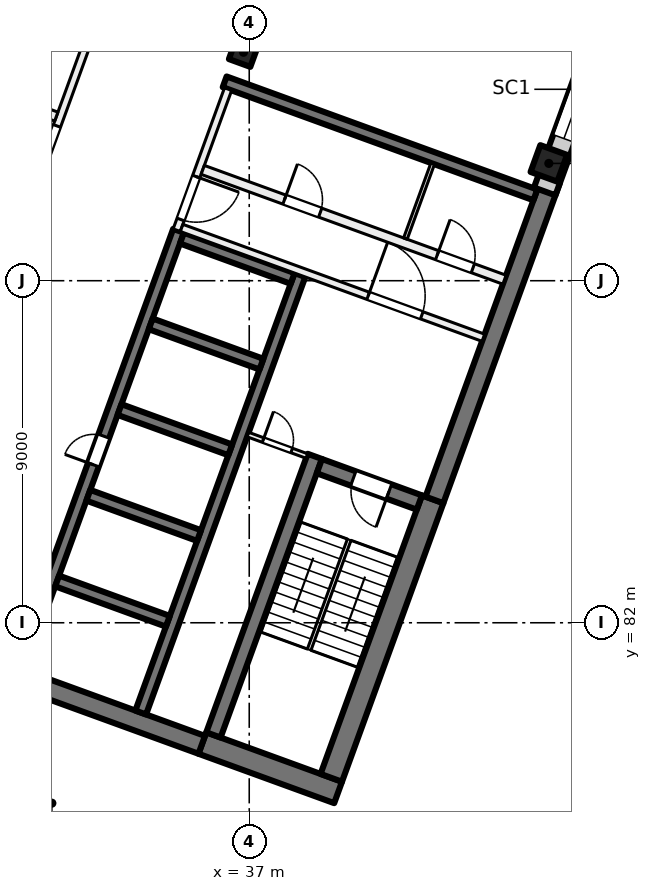
"""IFC4 building model, lengths in metres.
Left out: names, types, materials, properties, quantities, classifications, styles, units other than length and angle.
Written with IfcOpenShell. Run it as: python <this file> out.ifc"""

import sys

from ifc_helpers import new_model, si_unit, direction, frame, frame_2d, origin, origin_2d, place, context, subcontext, project, spatial, rectangle, extrude, element, fill, save


model = new_model("IFC4")
c1 = context("Model", 3, precision=1e-05, world=origin(), true_north=direction((0.0, 1.0)))
c2 = subcontext(c1, "Body", "Model", "MODEL_VIEW")
j1 = project(units=[si_unit("LENGTHUNIT", "METRE"), si_unit("PLANEANGLEUNIT", "RADIAN")], contexts=[c1])
p1 = place(None, origin())
s1 = spatial("IfcSite", under=j1, at=p1, CompositionType="ELEMENT")
p2 = place(p1, origin())
s2 = spatial("IfcBuilding", under=s1, at=p2, CompositionType="ELEMENT")
p3 = place(p2, frame((0.0, 0.0, 216.0)))
s3 = spatial("IfcBuildingStorey", under=s2, at=p3, CompositionType="ELEMENT", Elevation=216.0)
p4 = place(p3, frame((36.849, 97.011, 0.0), z_axis=(0.0, 0.0, 1.0), x_axis=(-0.342020143326, -0.939692620786, 0.0)))
e1 = element("IfcColumn", 1, at=p4, inside=s3, PredefinedType="COLUMN", context=c2, shape_type="SweptSolid", body=[
    extrude(rectangle(XDim=0.6, YDim=0.6, at=origin_2d()), origin(), (0.0, 0.0, 1.0), 4.0),
])
p5 = place(p3, frame((44.884, 94.087, 0.0), z_axis=(0.0, 0.0, 1.0), x_axis=(-0.342020143326, -0.939692620786, 0.0)))
e2 = element("IfcColumn", 2, at=p5, inside=s3, PredefinedType="COLUMN", context=c2, shape_type="SweptSolid", body=[
    extrude(rectangle(XDim=0.75, YDim=0.75, at=origin_2d()), origin(), (0.0, 0.0, 1.0), 4.0),
])
p6 = place(p3, frame((39.338, 77.535, 0.0), z_axis=(0.0, 0.0, 1.0), x_axis=(-0.939701471648, 0.341995824804, 0.0)))
e3 = element("IfcWall", 3, at=p6, inside=s3, PredefinedType="SHEAR", context=c2, shape_type="SweptSolid", body=[
    extrude(rectangle(XDim=3.8, YDim=0.6, at=frame_2d((1.9, 0.0))), origin(), (0.0, 0.0, 1.0), 4.0),
])
p7 = place(p3, frame((35.75, 78.788, 0.0), z_axis=(0.0, 0.0, 1.0), x_axis=(-0.939692894512, 0.342019391267, 0.0)))
e4 = element("IfcWall", 4, at=p7, inside=s3, PredefinedType="SHEAR", context=c2, shape_type="SweptSolid", body=[
    extrude(rectangle(XDim=14.4, YDim=0.5, at=frame_2d((7.2, 0.0))), origin(), (0.0, 0.0, 1.0), 4.0),
])
p8 = place(p3, frame((39.159, 77.92, 0.0), z_axis=(0.0, 0.0, 1.0), x_axis=(0.342016982193, 0.939693771338, 0.0)))
e5 = element("IfcWall", 5, at=p8, inside=s3, PredefinedType="SHEAR", context=c2, shape_type="SweptSolid", body=[
    extrude(rectangle(XDim=7.8, YDim=0.6, at=frame_2d((3.9, 0.0))), origin(), (0.0, 0.0, 1.0), 4.0),
])
p9 = place(p3, frame((41.874, 85.232, 0.0), z_axis=(0.0, 0.0, 1.0), x_axis=(0.342020437038, 0.939692513883, 0.0)))
e6 = element("IfcWall", 6, at=p9, inside=s3, PredefinedType="SHEAR", context=c2, shape_type="SweptSolid", body=[
    extrude(rectangle(XDim=8.975, YDim=0.5, at=frame_2d((4.487, 0.0))), origin(), (0.0, 0.0, 1.0), 4.0),
])
p10 = place(p3, frame((36.058, 79.048, 0.0), z_axis=(0.0, 0.0, 1.0), x_axis=(0.342016982193, 0.939693771338, 0.0)))
e7 = element("IfcWall", 7, at=p10, inside=s3, PredefinedType="SHEAR", context=c2, shape_type="SweptSolid", body=[
    extrude(rectangle(XDim=7.8, YDim=0.4, at=frame_2d((3.9, 0.0))), origin(), (0.0, 0.0, 1.0), 4.0),
])
p11 = place(p3, frame((41.476, 85.164, 0.0), z_axis=(0.0, 0.0, 1.0), x_axis=(-0.939678810556, 0.342058084236, 0.0)))
e8 = element("IfcWall", 8, at=p11, inside=s3, PredefinedType="SHEAR", context=c2, shape_type="SweptSolid", body=[
    extrude(rectangle(XDim=2.8, YDim=0.4, at=frame_2d((1.4, 0.0))), origin(), (0.0, 0.0, 1.0), 4.0),
])
p12 = place(p11, frame((0.85, 0.0, 0.0)))
e9 = element("IfcOpeningElement", 9, at=p12, cuts=e8, PredefinedType="OPENING", context=c2, shape_type="SweptSolid", body=[
    extrude(rectangle(XDim=1.0, YDim=2.1, at=frame_2d((0.5, 1.05))), frame((0.0, 0.21, 0.0), z_axis=(0.0, -1.0, 0.0), x_axis=(1.0, 0.0, 0.0)), (0.0, 0.0, 1.0), 0.42),
])
p13 = place(p3, frame((30.949, 80.801, 0.0), z_axis=(0.0, 0.0, 1.0), x_axis=(0.342016684409, 0.939693879721, 0.0)))
e10 = element("IfcWall", 10, at=p13, inside=s3, PredefinedType="SHEAR", context=c2, shape_type="SweptSolid", body=[
    extrude(rectangle(XDim=12.25, YDim=0.3, at=frame_2d((6.125, 0.0))), origin(), (0.0, 0.0, 1.0), 4.0),
])
p14 = place(p13, frame((0.9, 0.0, 0.0)))
e11 = element("IfcOpeningElement", 11, at=p14, cuts=e10, PredefinedType="OPENING", context=c2, shape_type="SweptSolid", body=[
    extrude(rectangle(XDim=0.8, YDim=2.1, at=frame_2d((0.4, 1.05))), frame((0.0, 0.16, 0.0), z_axis=(0.0, -1.0, 0.0), x_axis=(1.0, 0.0, 0.0)), (0.0, 0.0, 1.0), 0.32),
])
p15 = place(p13, frame((5.7, 0.0, 0.0)))
e12 = element("IfcOpeningElement", 12, at=p15, cuts=e10, PredefinedType="OPENING", context=c2, shape_type="SweptSolid", body=[
    extrude(rectangle(XDim=0.8, YDim=2.1, at=frame_2d((0.4, 1.05))), frame((0.0, 0.16, 0.0), z_axis=(0.0, -1.0, 0.0), x_axis=(1.0, 0.0, 0.0)), (0.0, 0.0, 1.0), 0.32),
])
p16 = place(p3, frame((34.144, 79.638, 0.0), z_axis=(0.0, 0.0, 1.0), x_axis=(0.342016684409, 0.939693879721, 0.0)))
e13 = element("IfcWall", 13, at=p16, inside=s3, PredefinedType="SHEAR", context=c2, shape_type="SweptSolid", body=[
    extrude(rectangle(XDim=12.25, YDim=0.3, at=frame_2d((6.125, 0.0))), origin(), (0.0, 0.0, 1.0), 4.0),
])
p17 = place(p3, frame((34.858, 82.039, 0.0), z_axis=(0.0, 0.0, 1.0), x_axis=(-0.939689908313, 0.342027595692, 0.0)))
e14 = element("IfcWall", 14, at=p17, inside=s3, PredefinedType="SHEAR", context=c2, shape_type="SweptSolid", body=[
    extrude(rectangle(XDim=3.1, YDim=0.3, at=frame_2d((1.55, 0.0))), origin(), (0.0, 0.0, 1.0), 4.0),
])
p18 = place(p3, frame((35.679, 84.294, 0.0), z_axis=(0.0, 0.0, 1.0), x_axis=(-0.939706007505, 0.341983361377, 0.0)))
e15 = element("IfcWall", 15, at=p18, inside=s3, PredefinedType="SHEAR", context=c2, shape_type="SweptSolid", body=[
    extrude(rectangle(XDim=3.1, YDim=0.3, at=frame_2d((1.55, 0.0))), origin(), (0.0, 0.0, 1.0), 4.0),
])
for number, where, z_axis, x_axis in (
    (16, (36.5, 86.549, 0.0), (0.0, 0.0, 1.0), (-0.94, 0.342, 0.0)),
    (17, (37.321, 88.805, 0.0), (0.0, 0.0, 1.0), (-0.94, 0.342, 0.0)),
    (18, (38.142, 91.06, 0.0), (0.0, 0.0, 1.0), (-0.94, 0.342, 0.0)),
):
    element("IfcWall", number, at=place(p3, frame(where, z_axis=z_axis, x_axis=x_axis)), inside=s3, PredefinedType="SHEAR", context=c2, shape_type="SweptSolid", body=[
        extrude(rectangle(XDim=3.1, YDim=0.3, at=frame_2d((1.55, 0.0))), origin(), (0.0, 0.0, 1.0), 4.0),
    ])
p19 = place(p3, frame((44.529, 93.258, 0.0), z_axis=(0.0, 0.0, 1.0), x_axis=(-0.9396917844, 0.342022441267, 0.0)))
e19 = element("IfcWall", 19, at=p19, inside=s3, PredefinedType="SHEAR", context=c2, shape_type="SweptSolid", body=[
    extrude(rectangle(XDim=8.7, YDim=0.3, at=frame_2d((4.35, 0.0))), origin(), (0.0, 0.0, 1.0), 4.0),
])
p20 = place(p3, frame((51.877, 112.862, 0.0), z_axis=(0.0, 0.0, 1.0), x_axis=(-0.342020589714, -0.939692458314, 0.0)))
e20 = element("IfcWall", 20, at=p20, inside=s3, PredefinedType="SOLIDWALL", context=c2, shape_type="SweptSolid", body=[
    extrude(rectangle(XDim=20.765, YDim=0.6, at=frame_2d((10.382, 0.0))), origin(), (0.0, 0.0, 1.0), 3.625),
])
p21 = place(p20, frame((2.785, 0.0, 0.9)))
e21 = element("IfcOpeningElement", 21, at=p21, cuts=e20, PredefinedType="OPENING", context=c2, shape_type="SweptSolid", body=[
    extrude(rectangle(XDim=3.0, YDim=2.4, at=frame_2d((1.5, 1.2))), frame((0.0, 0.31, 0.0), z_axis=(0.0, -1.0, 0.0), x_axis=(1.0, 0.0, 0.0)), (0.0, 0.0, 1.0), 0.62),
])
p22 = place(p20, frame((7.285, 0.0, 0.9)))
e22 = element("IfcOpeningElement", 22, at=p22, cuts=e20, PredefinedType="OPENING", context=c2, shape_type="SweptSolid", body=[
    extrude(rectangle(XDim=3.0, YDim=2.4, at=frame_2d((1.5, 1.2))), frame((0.0, 0.31, 0.0), z_axis=(0.0, -1.0, 0.0), x_axis=(1.0, 0.0, 0.0)), (0.0, 0.0, 1.0), 0.62),
])
p23 = place(p20, frame((11.785, 0.0, 0.9)))
e23 = element("IfcOpeningElement", 23, at=p23, cuts=e20, PredefinedType="OPENING", context=c2, shape_type="SweptSolid", body=[
    extrude(rectangle(XDim=3.0, YDim=2.4, at=frame_2d((1.5, 1.2))), frame((0.0, 0.31, 0.0), z_axis=(0.0, -1.0, 0.0), x_axis=(1.0, 0.0, 0.0)), (0.0, 0.0, 1.0), 0.62),
])
p24 = place(p20, frame((16.285, 0.0, 0.9)))
e24 = element("IfcOpeningElement", 24, at=p24, cuts=e20, PredefinedType="OPENING", context=c2, shape_type="SweptSolid", body=[
    extrude(rectangle(XDim=3.0, YDim=2.4, at=frame_2d((1.5, 1.2))), frame((0.0, 0.31, 0.0), z_axis=(0.0, -1.0, 0.0), x_axis=(1.0, 0.0, 0.0)), (0.0, 0.0, 1.0), 0.62),
])
p25 = place(p3, frame((31.427, 93.663, 0.0), z_axis=(0.0, 0.0, 1.0), x_axis=(0.342030870568, 0.93968871632, 0.0)))
e25 = element("IfcWall", 25, at=p25, inside=s3, PredefinedType="PARTITIONING", context=c2, shape_type="SweptSolid", body=[
    extrude(rectangle(XDim=3.95, YDim=0.2, at=frame_2d((1.975, 0.0))), origin(), (0.0, 0.0, 1.0), 3.625),
])
p26 = place(p25, frame((0.3, 0.0, 0.0)))
e26 = element("IfcOpeningElement", 26, at=p26, cuts=e25, PredefinedType="OPENING", context=c2, shape_type="SweptSolid", body=[
    extrude(rectangle(XDim=1.2, YDim=2.1, at=frame_2d((0.6, 1.05))), frame((0.0, 0.11, 0.0), z_axis=(0.0, -1.0, 0.0), x_axis=(1.0, 0.0, 0.0)), (0.0, 0.0, 1.0), 0.22),
])
p27 = place(p3, frame((23.983, 98.208, 0.0), z_axis=(0.0, 0.0, 1.0), x_axis=(0.939699751196, -0.342000552051, 0.0)))
e27 = element("IfcWall", 27, at=p27, inside=s3, PredefinedType="PARTITIONING", context=c2, shape_type="SweptSolid", body=[
    extrude(rectangle(XDim=8.45, YDim=0.25, at=frame_2d((4.225, 0.0))), origin(), (0.0, 0.0, 1.0), 3.625),
])
p28 = place(p27, frame((5.96, 0.0, 0.0)))
e28 = element("IfcOpeningElement", 28, at=p28, cuts=e27, PredefinedType="OPENING", context=c2, shape_type="SweptSolid", body=[
    extrude(rectangle(XDim=0.8, YDim=2.1, at=frame_2d((0.4, 1.05))), frame((0.0, 0.135, 0.0), z_axis=(0.0, -1.0, 0.0), x_axis=(1.0, 0.0, 0.0)), (0.0, 0.0, 1.0), 0.27),
])
p29 = place(p27, frame((1.685, 0.0, 0.0)))
e29 = element("IfcOpeningElement", 29, at=p29, cuts=e27, PredefinedType="OPENING", context=c2, shape_type="SweptSolid", body=[
    extrude(rectangle(XDim=0.8, YDim=2.1, at=frame_2d((0.4, 1.05))), frame((0.0, 0.135, 0.0), z_axis=(0.0, -1.0, 0.0), x_axis=(1.0, 0.0, 0.0)), (0.0, 0.0, 1.0), 0.27),
])
p30 = place(p3, frame((36.443, 96.041, 0.0), z_axis=(0.0, 0.0, 1.0), x_axis=(-0.341996156931, -0.939701350773, 0.0)))
e30 = element("IfcWall", 30, at=p30, inside=s3, PredefinedType="PARTITIONING", context=c2, shape_type="SweptSolid", body=[
    extrude(rectangle(XDim=3.95, YDim=0.2, at=frame_2d((1.975, 0.0))), origin(), (0.0, 0.0, 1.0), 3.625),
])
p31 = place(p30, frame((2.45, 0.0, 0.0)))
e31 = element("IfcOpeningElement", 31, at=p31, cuts=e30, PredefinedType="OPENING", context=c2, shape_type="SweptSolid", body=[
    extrude(rectangle(XDim=1.2, YDim=2.1, at=frame_2d((0.6, 1.05))), frame((0.0, 0.11, 0.0), z_axis=(0.0, -1.0, 0.0), x_axis=(1.0, 0.0, 0.0)), (0.0, 0.0, 1.0), 0.22),
])
p32 = place(p3, frame((35.22, 92.389, 0.0), z_axis=(0.0, 0.0, 1.0), x_axis=(0.939690465531, -0.342026064782, 0.0)))
e32 = element("IfcWall", 32, at=p32, inside=s3, PredefinedType="PARTITIONING", context=c2, shape_type="SweptSolid", body=[
    extrude(rectangle(XDim=8.45, YDim=0.2, at=frame_2d((4.225, 0.0))), origin(), (0.0, 0.0, 1.0), 3.625),
])
p33 = place(p32, frame((5.225, 0.0, 0.0)))
e33 = element("IfcOpeningElement", 33, at=p33, cuts=e32, PredefinedType="OPENING", context=c2, shape_type="SweptSolid", body=[
    extrude(rectangle(XDim=1.5, YDim=2.1, at=frame_2d((0.75, 1.05))), frame((0.0, 0.11, 0.0), z_axis=(0.0, -1.0, 0.0), x_axis=(1.0, 0.0, 0.0)), (0.0, 0.0, 1.0), 0.22),
])
p34 = place(p3, frame((35.776, 93.916, 0.0), z_axis=(0.0, 0.0, 1.0), x_axis=(0.939690465531, -0.342026064782, 0.0)))
e34 = element("IfcWall", 34, at=p34, inside=s3, PredefinedType="PARTITIONING", context=c2, shape_type="SweptSolid", body=[
    extrude(rectangle(XDim=8.45, YDim=0.25, at=frame_2d((4.225, 0.0))), origin(), (0.0, 0.0, 1.0), 3.625),
])
p35 = place(p34, frame((2.29, 0.0, 0.0)))
e35 = element("IfcOpeningElement", 35, at=p35, cuts=e34, PredefinedType="OPENING", context=c2, shape_type="SweptSolid", body=[
    extrude(rectangle(XDim=1.0, YDim=2.1, at=frame_2d((0.5, 1.05))), frame((0.0, 0.135, 0.0), z_axis=(0.0, -1.0, 0.0), x_axis=(1.0, 0.0, 0.0)), (0.0, 0.0, 1.0), 0.27),
])
p36 = place(p34, frame((6.565, 0.0, 0.0)))
e36 = element("IfcOpeningElement", 36, at=p36, cuts=e34, PredefinedType="OPENING", context=c2, shape_type="SweptSolid", body=[
    extrude(rectangle(XDim=1.0, YDim=2.1, at=frame_2d((0.5, 1.05))), frame((0.0, 0.135, 0.0), z_axis=(0.0, -1.0, 0.0), x_axis=(1.0, 0.0, 0.0)), (0.0, 0.0, 1.0), 0.27),
])
p37 = place(p3, frame((36.966, 86.952, 0.0), z_axis=(0.0, 0.0, 1.0), x_axis=(0.939672407396, -0.342075674051, 0.0)))
e37 = element("IfcWall", 37, at=p37, inside=s3, PredefinedType="PARTITIONING", context=c2, shape_type="SweptSolid", body=[
    extrude(rectangle(XDim=1.65, YDim=0.125, at=frame_2d((0.825, 0.0))), origin(), (0.0, 0.0, 1.0), 3.625),
])
p38 = place(p37, frame((0.425, 0.0, 0.0)))
e38 = element("IfcOpeningElement", 38, at=p38, cuts=e37, PredefinedType="OPENING", context=c2, shape_type="SweptSolid", body=[
    extrude(rectangle(XDim=0.8, YDim=2.1, at=frame_2d((0.4, 1.05))), frame((0.0, 0.073, 0.0), z_axis=(0.0, -1.0, 0.0), x_axis=(1.0, 0.0, 0.0)), (0.0, 0.0, 1.0), 0.145),
])
p39 = place(p3, frame((41.828, 94.082, 0.0), z_axis=(0.0, 0.0, 1.0), x_axis=(-0.342023078919, -0.939691552312, 0.0)))
e39 = element("IfcWall", 39, at=p39, inside=s3, PredefinedType="PARTITIONING", context=c2, shape_type="SweptSolid", body=[
    extrude(rectangle(XDim=2.1, YDim=0.1, at=frame_2d((1.05, 0.0))), origin(), (0.0, 0.0, 1.0), 3.625),
])
p40 = place(p24, origin())
e40 = element("IfcWindow", 40, at=p40, inside=s3, PartitioningType="SINGLE_PANEL", PredefinedType="WINDOW", context=c2, shape_type="SweptSolid", body=[
    extrude(rectangle(XDim=3.0, YDim=2.4, at=frame_2d((1.5, 1.2))), frame((0.0, 0.03, 0.0), z_axis=(0.0, -1.0, 0.0), x_axis=(1.0, 0.0, 0.0)), (0.0, 0.0, 1.0), 0.06),
])
fill(e24, e40)
p41 = place(p15, origin())
e41 = element("IfcDoor", 41, at=p41, inside=s3, OperationType="SINGLE_SWING_RIGHT", PredefinedType="DOOR", context=c2, shape_type="SweptSolid", body=[
    extrude(rectangle(XDim=0.8, YDim=2.1, at=frame_2d((0.4, 1.05))), frame((0.0, 0.025, 0.0), z_axis=(0.0, -1.0, 0.0), x_axis=(1.0, 0.0, 0.0)), (0.0, 0.0, 1.0), 0.05),
])
fill(e12, e41)
p42 = place(p26, origin())
e42 = element("IfcDoor", 42, at=p42, inside=s3, OperationType="DOUBLE_DOOR_SINGLE_SWING", PredefinedType="DOOR", context=c2, shape_type="SweptSolid", body=[
    extrude(rectangle(XDim=1.2, YDim=2.1, at=frame_2d((0.6, 1.05))), frame((0.0, 0.025, 0.0), z_axis=(0.0, -1.0, 0.0), x_axis=(1.0, 0.0, 0.0)), (0.0, 0.0, 1.0), 0.05),
])
fill(e26, e42)
p43 = place(p31, origin())
e43 = element("IfcDoor", 43, at=p43, inside=s3, OperationType="DOUBLE_DOOR_SINGLE_SWING", PredefinedType="DOOR", context=c2, shape_type="SweptSolid", body=[
    extrude(rectangle(XDim=1.2, YDim=2.1, at=frame_2d((0.6, 1.05))), frame((0.0, 0.025, 0.0), z_axis=(0.0, -1.0, 0.0), x_axis=(1.0, 0.0, 0.0)), (0.0, 0.0, 1.0), 0.05),
])
fill(e31, e43)
p44 = place(p33, origin())
e44 = element("IfcDoor", 44, at=p44, inside=s3, OperationType="DOUBLE_DOOR_SINGLE_SWING", PredefinedType="DOOR", context=c2, shape_type="SweptSolid", body=[
    extrude(rectangle(XDim=1.5, YDim=2.1, at=frame_2d((0.75, 1.05))), frame((0.0, 0.025, 0.0), z_axis=(0.0, -1.0, 0.0), x_axis=(1.0, 0.0, 0.0)), (0.0, 0.0, 1.0), 0.05),
])
fill(e33, e44)
p45 = place(p12, origin())
e45 = element("IfcDoor", 45, at=p45, inside=s3, OperationType="SINGLE_SWING_RIGHT", PredefinedType="DOOR", context=c2, shape_type="SweptSolid", body=[
    extrude(rectangle(XDim=1.0, YDim=2.1, at=frame_2d((0.5, 1.05))), frame((0.0, 0.025, 0.0), z_axis=(0.0, -1.0, 0.0), x_axis=(1.0, 0.0, 0.0)), (0.0, 0.0, 1.0), 0.05),
])
fill(e9, e45)
p46 = place(p38, origin())
e46 = element("IfcDoor", 46, at=p46, inside=s3, OperationType="SINGLE_SWING_LEFT", PredefinedType="DOOR", context=c2, shape_type="SweptSolid", body=[
    extrude(rectangle(XDim=0.8, YDim=2.1, at=frame_2d((0.4, 1.05))), frame((0.0, 0.025, 0.0), z_axis=(0.0, -1.0, 0.0), x_axis=(1.0, 0.0, 0.0)), (0.0, 0.0, 1.0), 0.05),
])
fill(e38, e46)
p47 = place(p35, origin())
e47 = element("IfcDoor", 47, at=p47, inside=s3, OperationType="SINGLE_SWING_RIGHT", PredefinedType="DOOR", context=c2, shape_type="SweptSolid", body=[
    extrude(rectangle(XDim=1.0, YDim=2.1, at=frame_2d((0.5, 1.05))), frame((0.0, 0.025, 0.0), z_axis=(0.0, -1.0, 0.0), x_axis=(1.0, 0.0, 0.0)), (0.0, 0.0, 1.0), 0.05),
])
fill(e35, e47)
p48 = place(p36, origin())
e48 = element("IfcDoor", 48, at=p48, inside=s3, OperationType="SINGLE_SWING_LEFT", PredefinedType="DOOR", context=c2, shape_type="SweptSolid", body=[
    extrude(rectangle(XDim=1.0, YDim=2.1, at=frame_2d((0.5, 1.05))), frame((0.0, 0.025, 0.0), z_axis=(0.0, -1.0, 0.0), x_axis=(1.0, 0.0, 0.0)), (0.0, 0.0, 1.0), 0.05),
])
fill(e36, e48)
save(model, sys.argv[1])
